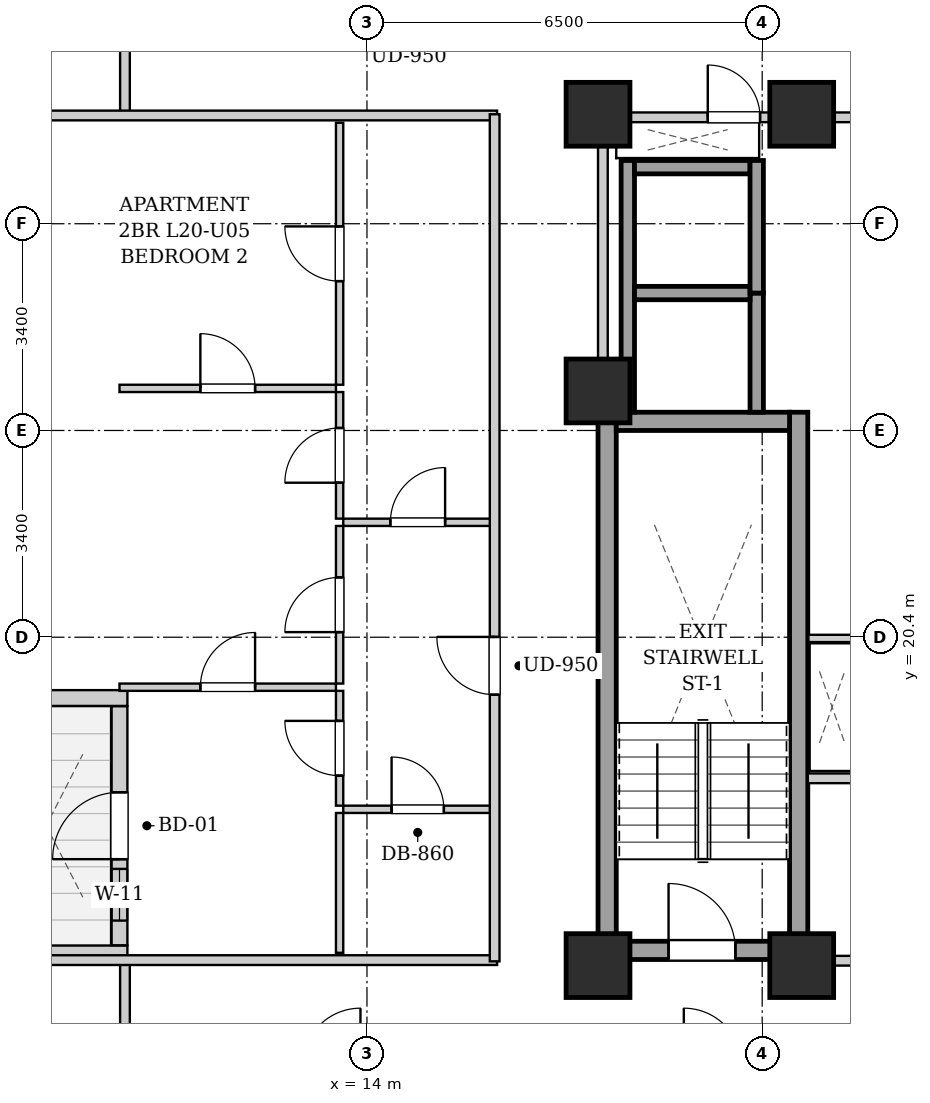
"""IFC4 building model, lengths in metres.
Left out: names, types, materials, properties, quantities, classifications, styles, units other than length and angle.
Written with IfcOpenShell. Run it as: python <this file> out.ifc"""

import sys

from ifc_helpers import new_model, si_unit, direction, frame, frame_2d, origin, origin_2d, place, context, subcontext, project, spatial, rectangle, extrude, element, fill, save


model = new_model("IFC4")
c1 = context("Model", 3, precision=1e-05, world=origin(), true_north=direction((0.0, 1.0)))
c2 = subcontext(c1, "Body", "Model", "MODEL_VIEW")
j1 = project(units=[si_unit("LENGTHUNIT", "METRE"), si_unit("PLANEANGLEUNIT", "RADIAN")], contexts=[c1])
p1 = place(None, origin())
s1 = spatial("IfcSite", under=j1, at=p1, CompositionType="ELEMENT")
p2 = place(p1, origin())
s2 = spatial("IfcBuilding", under=s1, at=p2, CompositionType="ELEMENT")
p3 = place(p2, frame((0.0, 0.0, 75.1)))
s3 = spatial("IfcBuildingStorey", under=s2, at=p3, CompositionType="ELEMENT", Elevation=75.1)
for number, where, z_axis, x_axis in (
    (1, (17.8, 15.0, 0.0), (0.0, 0.0, 1.0), (1.0, 0.0, 0.0)),
    (2, (21.15, 15.0, 0.0), (0.0, 0.0, 1.0), (1.0, 0.0, 0.0)),
    (3, (17.8, 29.0, 0.0), (0.0, 0.0, 1.0), (1.0, 0.0, 0.0)),
    (4, (21.15, 29.0, 0.0), (0.0, 0.0, 1.0), (1.0, 0.0, 0.0)),
    (5, (17.8, 24.45, 0.0), (0.0, 0.0, 1.0), (1.0, 0.0, 0.0)),
):
    element("IfcColumn", number, at=place(p3, frame(where, z_axis=z_axis, x_axis=x_axis)), inside=s3, PredefinedType="COLUMN", context=c2, shape_type="SweptSolid", body=[
        extrude(rectangle(XDim=1.05, YDim=1.05, at=origin_2d()), origin(), (0.0, 0.0, 1.0), 3.2),
    ])
p4 = place(p3, frame((7.66, 15.2, 0.0), z_axis=(0.0, 0.0, 1.0), x_axis=(1.0, 0.0, 0.0)))
e6 = element("IfcWall", 6, at=p4, inside=s3, PredefinedType="SOLIDWALL", context=c2, shape_type="SweptSolid", body=[
    extrude(rectangle(XDim=2.4, YDim=0.26, at=frame_2d((1.2, 0.0))), origin(), (0.0, 0.0, 1.0), 2.94),
])
p5 = place(p3, frame((9.93, 15.334, 0.0), z_axis=(0.0, 0.0, 1.0), x_axis=(0.0, 1.0, 0.0)))
e7 = element("IfcWall", 7, at=p5, inside=s3, PredefinedType="SOLIDWALL", context=c2, shape_type="SweptSolid", body=[
    extrude(rectangle(XDim=3.932, YDim=0.26, at=frame_2d((1.966, 0.0))), origin(), (0.0, 0.0, 1.0), 2.94),
])
p6 = place(p5, frame((1.416, 0.0, 0.0)))
e8 = element("IfcOpeningElement", 8, at=p6, cuts=e7, PredefinedType="OPENING", context=c2, shape_type="SweptSolid", body=[
    extrude(rectangle(XDim=1.1, YDim=2.0, at=frame_2d((0.55, 1.0))), frame((0.0, 0.14, 0.0), z_axis=(0.0, -1.0, 0.0), x_axis=(1.0, 0.0, 0.0)), (0.0, 0.0, 1.0), 0.28),
])
p7 = place(p5, frame((0.406, 0.0, 0.55)))
e9 = element("IfcOpeningElement", 9, at=p7, cuts=e7, PredefinedType="OPENING", context=c2, shape_type="SweptSolid", body=[
    extrude(rectangle(XDim=0.85, YDim=1.2, at=frame_2d((0.425, 0.6))), frame((0.0, 0.14, 0.0), z_axis=(0.0, -1.0, 0.0), x_axis=(1.0, 0.0, 0.0)), (0.0, 0.0, 1.0), 0.28),
])
p8 = place(p3, frame((10.06, 19.4, 0.0), z_axis=(0.0, 0.0, 1.0), x_axis=(-1.0, 0.0, 0.0)))
e10 = element("IfcWall", 10, at=p8, inside=s3, PredefinedType="SOLIDWALL", context=c2, shape_type="SweptSolid", body=[
    extrude(rectangle(XDim=2.4, YDim=0.26, at=frame_2d((1.2, 0.0))), origin(), (0.0, 0.0, 1.0), 2.94),
])
for number, where, z_axis, x_axis in (
    (11, (17.95, 15.1, 0.0), (0.0, 0.0, 1.0), (0.0, 1.0, 0.0)),
    (12, (21.1, 15.1, 0.0), (0.0, 0.0, 1.0), (0.0, 1.0, 0.0)),
):
    element("IfcWall", number, at=place(p3, frame(where, z_axis=z_axis, x_axis=x_axis)), inside=s3, PredefinedType="SHEAR", context=c2, shape_type="SweptSolid", body=[
        extrude(rectangle(XDim=9.0, YDim=0.3, at=frame_2d((4.5, 0.0))), origin(), (0.0, 0.0, 1.0), 2.94),
    ])
p9 = place(p3, frame((18.1, 23.95, 0.0), z_axis=(0.0, 0.0, 1.0), x_axis=(1.0, 0.0, 0.0)))
e13 = element("IfcWall", 13, at=p9, inside=s3, PredefinedType="SHEAR", context=c2, shape_type="SweptSolid", body=[
    extrude(rectangle(XDim=2.85, YDim=0.3, at=frame_2d((1.425, 0.0))), origin(), (0.0, 0.0, 1.0), 2.94),
])
p10 = place(p3, frame((18.1, 15.25, 0.0), z_axis=(0.0, 0.0, 1.0), x_axis=(1.0, 0.0, 0.0)))
e14 = element("IfcWall", 14, at=p10, inside=s3, PredefinedType="SHEAR", context=c2, shape_type="SweptSolid", body=[
    extrude(rectangle(XDim=2.85, YDim=0.3, at=frame_2d((1.425, 0.0))), origin(), (0.0, 0.0, 1.0), 2.94),
])
p11 = place(p10, frame((0.86, 0.0, 0.0)))
e15 = element("IfcOpeningElement", 15, at=p11, cuts=e14, PredefinedType="OPENING", context=c2, shape_type="SweptSolid", body=[
    extrude(rectangle(XDim=1.1, YDim=2.05, at=frame_2d((0.55, 1.025))), frame((0.0, 0.16, 0.0), z_axis=(0.0, -1.0, 0.0), x_axis=(1.0, 0.0, 0.0)), (0.0, 0.0, 1.0), 0.32),
])
p12 = place(p3, frame((18.29, 24.1, 0.0), z_axis=(0.0, 0.0, 1.0), x_axis=(0.0, 1.0, 0.0)))
e16 = element("IfcWall", 16, at=p12, inside=s3, PredefinedType="SHEAR", context=c2, shape_type="SweptSolid", body=[
    extrude(rectangle(XDim=4.14, YDim=0.22, at=frame_2d((2.07, 0.0))), origin(), (0.0, 0.0, 1.0), 2.94),
])
p13 = place(p3, frame((20.41, 24.1, 0.0), z_axis=(0.0, 0.0, 1.0), x_axis=(0.0, 1.0, 0.0)))
e17 = element("IfcWall", 17, at=p13, inside=s3, PredefinedType="SHEAR", context=c2, shape_type="SweptSolid", body=[
    extrude(rectangle(XDim=1.96, YDim=0.22, at=frame_2d((0.98, 0.0))), origin(), (0.0, 0.0, 1.0), 2.94),
])
for number, where, z_axis, x_axis in (
    (18, (18.4, 26.06, 0.0), (0.0, 0.0, 1.0), (1.0, 0.0, 0.0)),
    (19, (18.4, 28.13, 0.0), (0.0, 0.0, 1.0), (1.0, 0.0, 0.0)),
):
    element("IfcWall", number, at=place(p3, frame(where, z_axis=z_axis, x_axis=x_axis)), inside=s3, PredefinedType="SHEAR", context=c2, shape_type="SweptSolid", body=[
        extrude(rectangle(XDim=1.9, YDim=0.22, at=frame_2d((0.95, 0.0))), origin(), (0.0, 0.0, 1.0), 2.94),
    ])
p14 = place(p3, frame((20.41, 26.06, 0.0), z_axis=(0.0, 0.0, 1.0), x_axis=(0.0, 1.0, 0.0)))
e20 = element("IfcWall", 20, at=p14, inside=s3, PredefinedType="SHEAR", context=c2, shape_type="SweptSolid", body=[
    extrude(rectangle(XDim=2.18, YDim=0.22, at=frame_2d((1.09, 0.0))), origin(), (0.0, 0.0, 1.0), 2.94),
])
p15 = place(p3, frame((21.25, 15.08, 0.0), z_axis=(0.0, 0.0, 1.0), x_axis=(1.0, 0.0, 0.0)))
e21 = element("IfcWall", 21, at=p15, inside=s3, PredefinedType="PARTITIONING", context=c2, shape_type="SweptSolid", body=[
    extrude(rectangle(XDim=8.5, YDim=0.16, at=frame_2d((4.25, 0.0))), origin(), (0.0, 0.0, 1.0), 2.309),
])
p16 = place(p15, frame((3.725, 0.0, 0.0)))
e22 = element("IfcOpeningElement", 22, at=p16, cuts=e21, PredefinedType="OPENING", context=c2, shape_type="SweptSolid", body=[
    extrude(rectangle(XDim=1.05, YDim=2.05, at=frame_2d((0.525, 1.025))), frame((0.0, 0.09, 0.0), z_axis=(0.0, -1.0, 0.0), x_axis=(1.0, 0.0, 0.0)), (0.0, 0.0, 1.0), 0.18),
])
p17 = place(p3, frame((21.25, 18.08, 0.0), z_axis=(0.0, 0.0, 1.0), x_axis=(1.0, 0.0, 0.0)))
e23 = element("IfcWall", 23, at=p17, inside=s3, PredefinedType="PARTITIONING", context=c2, shape_type="SweptSolid", body=[
    extrude(rectangle(XDim=1.1, YDim=0.16, at=frame_2d((0.55, 0.0))), origin(), (0.0, 0.0, 1.0), 2.94),
])
p18 = place(p3, frame((17.88, 24.12, 0.0), z_axis=(0.0, 0.0, 1.0), x_axis=(0.0, 1.0, 0.0)))
e24 = element("IfcWall", 24, at=p18, inside=s3, PredefinedType="PARTITIONING", context=c2, shape_type="SweptSolid", body=[
    extrude(rectangle(XDim=4.76, YDim=0.16, at=frame_2d((2.38, 0.0))), origin(), (0.0, 0.0, 1.0), 2.94),
])
p19 = place(p3, frame((17.96, 28.95, 0.0), z_axis=(0.0, 0.0, 1.0), x_axis=(1.0, 0.0, 0.0)))
e25 = element("IfcWall", 25, at=p19, inside=s3, PredefinedType="PARTITIONING", context=c2, shape_type="SweptSolid", body=[
    extrude(rectangle(XDim=4.29, YDim=0.16, at=frame_2d((2.145, 0.0))), origin(), (0.0, 0.0, 1.0), 2.309),
])
p20 = place(p19, frame((1.645, 0.0, 0.0)))
e26 = element("IfcOpeningElement", 26, at=p20, cuts=e25, PredefinedType="OPENING", context=c2, shape_type="SweptSolid", body=[
    extrude(rectangle(XDim=0.86, YDim=2.05, at=frame_2d((0.43, 1.025))), frame((0.0, 0.09, 0.0), z_axis=(0.0, -1.0, 0.0), x_axis=(1.0, 0.0, 0.0)), (0.0, 0.0, 1.0), 0.18),
])
p21 = place(p3, frame((22.28, 20.38, 0.0), z_axis=(0.0, 0.0, 1.0), x_axis=(-1.0, 0.0, 0.0)))
e27 = element("IfcWall", 27, at=p21, inside=s3, PredefinedType="PARTITIONING", context=c2, shape_type="SweptSolid", body=[
    extrude(rectangle(XDim=1.02, YDim=0.12, at=frame_2d((0.51, 0.0))), origin(), (0.0, 0.0, 1.0), 2.94),
])
for number, where, z_axis, x_axis in (
    (28, (10.02, 13.35, 0.0), (0.0, 0.0, 1.0), (0.0, 1.0, 0.0)),
    (29, (10.02, 28.98, 0.0), (0.0, 0.0, 1.0), (0.0, 1.0, 0.0)),
):
    element("IfcWall", number, at=place(p3, frame(where, z_axis=z_axis, x_axis=x_axis)), inside=s3, PredefinedType="PARTITIONING", context=c2, shape_type="SweptSolid", body=[
        extrude(rectangle(XDim=1.74, YDim=0.16, at=frame_2d((0.87, 0.0))), origin(), (0.0, 0.0, 1.0), 2.94),
    ])
for number, where, z_axis, x_axis in (
    (30, (7.78, 15.09, 0.0), (0.0, 0.0, 1.0), (1.0, 0.0, 0.0)),
    (31, (7.78, 28.98, 0.0), (0.0, 0.0, 1.0), (1.0, 0.0, 0.0)),
):
    element("IfcWall", number, at=place(p3, frame(where, z_axis=z_axis, x_axis=x_axis)), inside=s3, PredefinedType="PARTITIONING", context=c2, shape_type="SweptSolid", body=[
        extrude(rectangle(XDim=8.36, YDim=0.16, at=frame_2d((4.18, 0.0))), origin(), (0.0, 0.0, 1.0), 2.309),
    ])
p22 = place(p3, frame((13.61, 22.29, 0.0), z_axis=(0.0, 0.0, 1.0), x_axis=(1.0, 0.0, 0.0)))
e32 = element("IfcWall", 32, at=p22, inside=s3, PredefinedType="PARTITIONING", context=c2, shape_type="SweptSolid", body=[
    extrude(rectangle(XDim=2.45, YDim=0.12, at=frame_2d((1.225, 0.0))), origin(), (0.0, 0.0, 1.0), 2.94),
])
p23 = place(p22, frame((0.775, 0.0, 0.0)))
e33 = element("IfcOpeningElement", 33, at=p23, cuts=e32, PredefinedType="OPENING", context=c2, shape_type="SweptSolid", body=[
    extrude(rectangle(XDim=0.9, YDim=2.05, at=frame_2d((0.45, 1.025))), frame((0.0, 0.07, 0.0), z_axis=(0.0, -1.0, 0.0), x_axis=(1.0, 0.0, 0.0)), (0.0, 0.0, 1.0), 0.14),
])
p24 = place(p3, frame((13.55, 22.35, 0.0), z_axis=(0.0, 0.0, 1.0), x_axis=(0.0, 1.0, 0.0)))
e34 = element("IfcWall", 34, at=p24, inside=s3, PredefinedType="PARTITIONING", context=c2, shape_type="SweptSolid", body=[
    extrude(rectangle(XDim=2.082, YDim=0.12, at=frame_2d((1.041, 0.0))), origin(), (0.0, 0.0, 1.0), 2.94),
])
p25 = place(p24, frame((0.591, 0.0, 0.0)))
e35 = element("IfcOpeningElement", 35, at=p25, cuts=e34, PredefinedType="OPENING", context=c2, shape_type="SweptSolid", body=[
    extrude(rectangle(XDim=0.9, YDim=2.05, at=frame_2d((0.45, 1.025))), frame((0.0, 0.07, 0.0), z_axis=(0.0, -1.0, 0.0), x_axis=(1.0, 0.0, 0.0)), (0.0, 0.0, 1.0), 0.14),
])
p26 = place(p3, frame((13.55, 24.552, 0.0), z_axis=(0.0, 0.0, 1.0), x_axis=(0.0, 1.0, 0.0)))
e36 = element("IfcWall", 36, at=p26, inside=s3, PredefinedType="PARTITIONING", context=c2, shape_type="SweptSolid", body=[
    extrude(rectangle(XDim=4.308, YDim=0.12, at=frame_2d((2.154, 0.0))), origin(), (0.0, 0.0, 1.0), 2.94),
])
p27 = place(p26, frame((1.704, 0.0, 0.0)))
e37 = element("IfcOpeningElement", 37, at=p27, cuts=e36, PredefinedType="OPENING", context=c2, shape_type="SweptSolid", body=[
    extrude(rectangle(XDim=0.9, YDim=2.05, at=frame_2d((0.45, 1.025))), frame((0.0, 0.07, 0.0), z_axis=(0.0, -1.0, 0.0), x_axis=(1.0, 0.0, 0.0)), (0.0, 0.0, 1.0), 0.14),
])
p28 = place(p3, frame((13.61, 17.57, 0.0), z_axis=(0.0, 0.0, 1.0), x_axis=(1.0, 0.0, 0.0)))
e38 = element("IfcWall", 38, at=p28, inside=s3, PredefinedType="PARTITIONING", context=c2, shape_type="SweptSolid", body=[
    extrude(rectangle(XDim=2.45, YDim=0.12, at=frame_2d((1.225, 0.0))), origin(), (0.0, 0.0, 1.0), 2.94),
])
p29 = place(p28, frame((0.795, 0.0, 0.0)))
e39 = element("IfcOpeningElement", 39, at=p29, cuts=e38, PredefinedType="OPENING", context=c2, shape_type="SweptSolid", body=[
    extrude(rectangle(XDim=0.86, YDim=2.05, at=frame_2d((0.43, 1.025))), frame((0.0, 0.07, 0.0), z_axis=(0.0, -1.0, 0.0), x_axis=(1.0, 0.0, 0.0)), (0.0, 0.0, 1.0), 0.14),
])
p30 = place(p3, frame((13.55, 15.21, 0.0), z_axis=(0.0, 0.0, 1.0), x_axis=(0.0, 1.0, 0.0)))
e40 = element("IfcWall", 40, at=p30, inside=s3, PredefinedType="PARTITIONING", context=c2, shape_type="SweptSolid", body=[
    extrude(rectangle(XDim=2.3, YDim=0.12, at=frame_2d((1.15, 0.0))), origin(), (0.0, 0.0, 1.0), 2.94),
])
p31 = place(p3, frame((13.55, 17.63, 0.0), z_axis=(0.0, 0.0, 1.0), x_axis=(0.0, 1.0, 0.0)))
e41 = element("IfcWall", 41, at=p31, inside=s3, PredefinedType="PARTITIONING", context=c2, shape_type="SweptSolid", body=[
    extrude(rectangle(XDim=1.888, YDim=0.12, at=frame_2d((0.944, 0.0))), origin(), (0.0, 0.0, 1.0), 2.94),
])
p32 = place(p31, frame((0.494, 0.0, 0.0)))
e42 = element("IfcOpeningElement", 42, at=p32, cuts=e41, PredefinedType="OPENING", context=c2, shape_type="SweptSolid", body=[
    extrude(rectangle(XDim=0.9, YDim=2.05, at=frame_2d((0.45, 1.025))), frame((0.0, 0.07, 0.0), z_axis=(0.0, -1.0, 0.0), x_axis=(1.0, 0.0, 0.0)), (0.0, 0.0, 1.0), 0.14),
])
p33 = place(p3, frame((13.55, 19.638, 0.0), z_axis=(0.0, 0.0, 1.0), x_axis=(0.0, 1.0, 0.0)))
e43 = element("IfcWall", 43, at=p33, inside=s3, PredefinedType="PARTITIONING", context=c2, shape_type="SweptSolid", body=[
    extrude(rectangle(XDim=2.592, YDim=0.12, at=frame_2d((1.296, 0.0))), origin(), (0.0, 0.0, 1.0), 2.94),
])
p34 = place(p33, frame((0.846, 0.0, 0.0)))
e44 = element("IfcOpeningElement", 44, at=p34, cuts=e43, PredefinedType="OPENING", context=c2, shape_type="SweptSolid", body=[
    extrude(rectangle(XDim=0.9, YDim=2.05, at=frame_2d((0.45, 1.025))), frame((0.0, 0.07, 0.0), z_axis=(0.0, -1.0, 0.0), x_axis=(1.0, 0.0, 0.0)), (0.0, 0.0, 1.0), 0.14),
])
p35 = place(p3, frame((9.93, 19.578, 0.0), z_axis=(0.0, 0.0, 1.0), x_axis=(1.0, 0.0, 0.0)))
e45 = element("IfcWall", 45, at=p35, inside=s3, PredefinedType="PARTITIONING", context=c2, shape_type="SweptSolid", body=[
    extrude(rectangle(XDim=3.56, YDim=0.12, at=frame_2d((1.78, 0.0))), origin(), (0.0, 0.0, 1.0), 2.94),
])
p36 = place(p35, frame((1.33, 0.0, 0.0)))
e46 = element("IfcOpeningElement", 46, at=p36, cuts=e45, PredefinedType="OPENING", context=c2, shape_type="SweptSolid", body=[
    extrude(rectangle(XDim=0.9, YDim=2.05, at=frame_2d((0.45, 1.025))), frame((0.0, 0.07, 0.0), z_axis=(0.0, -1.0, 0.0), x_axis=(1.0, 0.0, 0.0)), (0.0, 0.0, 1.0), 0.14),
])
p37 = place(p3, frame((9.93, 24.492, 0.0), z_axis=(0.0, 0.0, 1.0), x_axis=(1.0, 0.0, 0.0)))
e47 = element("IfcWall", 47, at=p37, inside=s3, PredefinedType="PARTITIONING", context=c2, shape_type="SweptSolid", body=[
    extrude(rectangle(XDim=3.56, YDim=0.12, at=frame_2d((1.78, 0.0))), origin(), (0.0, 0.0, 1.0), 2.518),
])
p38 = place(p37, frame((1.33, 0.0, 0.0)))
e48 = element("IfcOpeningElement", 48, at=p38, cuts=e47, PredefinedType="OPENING", context=c2, shape_type="SweptSolid", body=[
    extrude(rectangle(XDim=0.9, YDim=2.05, at=frame_2d((0.45, 1.025))), frame((0.0, 0.07, 0.0), z_axis=(0.0, -1.0, 0.0), x_axis=(1.0, 0.0, 0.0)), (0.0, 0.0, 1.0), 0.14),
])
p39 = place(p3, frame((16.1, 15.07, 0.0), z_axis=(0.0, 0.0, 1.0), x_axis=(0.0, 1.0, 0.0)))
e49 = element("IfcWall", 49, at=p39, inside=s3, PredefinedType="PARTITIONING", context=c2, shape_type="SweptSolid", body=[
    extrude(rectangle(XDim=13.93, YDim=0.16, at=frame_2d((6.965, 0.0))), origin(), (0.0, 0.0, 1.0), 2.94),
])
p40 = place(p39, frame((4.385, 0.0, 0.0)))
e50 = element("IfcOpeningElement", 50, at=p40, cuts=e49, PredefinedType="OPENING", context=c2, shape_type="SweptSolid", body=[
    extrude(rectangle(XDim=0.95, YDim=2.1, at=frame_2d((0.475, 1.05))), frame((0.0, 0.09, 0.0), z_axis=(0.0, -1.0, 0.0), x_axis=(1.0, 0.0, 0.0)), (0.0, 0.0, 1.0), 0.18),
])
p41 = place(p11, origin())
e51 = element("IfcDoor", 51, at=p41, inside=s3, OperationType="SINGLE_SWING_LEFT", PredefinedType="DOOR", context=c2, shape_type="SweptSolid", body=[
    extrude(rectangle(XDim=1.1, YDim=2.05, at=frame_2d((0.55, 1.025))), frame((0.0, 0.025, 0.0), z_axis=(0.0, -1.0, 0.0), x_axis=(1.0, 0.0, 0.0)), (0.0, 0.0, 1.0), 0.05),
])
fill(e15, e51)
p42 = place(p20, origin())
e52 = element("IfcDoor", 52, at=p42, inside=s3, OperationType="SINGLE_SWING_LEFT", PredefinedType="DOOR", context=c2, shape_type="SweptSolid", body=[
    extrude(rectangle(XDim=0.86, YDim=2.05, at=frame_2d((0.43, 1.025))), frame((0.0, 0.025, 0.0), z_axis=(0.0, -1.0, 0.0), x_axis=(1.0, 0.0, 0.0)), (0.0, 0.0, 1.0), 0.05),
])
fill(e26, e52)
p43 = place(p23, origin())
e53 = element("IfcDoor", 53, at=p43, inside=s3, OperationType="SINGLE_SWING_RIGHT", PredefinedType="DOOR", context=c2, shape_type="SweptSolid", body=[
    extrude(rectangle(XDim=0.9, YDim=2.05, at=frame_2d((0.45, 1.025))), frame((0.0, 0.025, 0.0), z_axis=(0.0, -1.0, 0.0), x_axis=(1.0, 0.0, 0.0)), (0.0, 0.0, 1.0), 0.05),
])
fill(e33, e53)
p44 = place(p25, origin())
e54 = element("IfcDoor", 54, at=p44, inside=s3, OperationType="SINGLE_SWING_LEFT", PredefinedType="DOOR", context=c2, shape_type="SweptSolid", body=[
    extrude(rectangle(XDim=0.9, YDim=2.05, at=frame_2d((0.45, 1.025))), frame((0.0, 0.025, 0.0), z_axis=(0.0, -1.0, 0.0), x_axis=(1.0, 0.0, 0.0)), (0.0, 0.0, 1.0), 0.05),
])
fill(e35, e54)
p45 = place(p27, origin())
e55 = element("IfcDoor", 55, at=p45, inside=s3, OperationType="SINGLE_SWING_RIGHT", PredefinedType="DOOR", context=c2, shape_type="SweptSolid", body=[
    extrude(rectangle(XDim=0.9, YDim=2.05, at=frame_2d((0.45, 1.025))), frame((0.0, 0.025, 0.0), z_axis=(0.0, -1.0, 0.0), x_axis=(1.0, 0.0, 0.0)), (0.0, 0.0, 1.0), 0.05),
])
fill(e37, e55)
p46 = place(p29, origin())
e56 = element("IfcDoor", 56, at=p46, inside=s3, OperationType="SINGLE_SWING_LEFT", PredefinedType="DOOR", context=c2, shape_type="SweptSolid", body=[
    extrude(rectangle(XDim=0.86, YDim=2.05, at=frame_2d((0.43, 1.025))), frame((0.0, 0.025, 0.0), z_axis=(0.0, -1.0, 0.0), x_axis=(1.0, 0.0, 0.0)), (0.0, 0.0, 1.0), 0.05),
])
fill(e39, e56)
p47 = place(p32, origin())
e57 = element("IfcDoor", 57, at=p47, inside=s3, OperationType="SINGLE_SWING_RIGHT", PredefinedType="DOOR", context=c2, shape_type="SweptSolid", body=[
    extrude(rectangle(XDim=0.9, YDim=2.05, at=frame_2d((0.45, 1.025))), frame((0.0, 0.025, 0.0), z_axis=(0.0, -1.0, 0.0), x_axis=(1.0, 0.0, 0.0)), (0.0, 0.0, 1.0), 0.05),
])
fill(e42, e57)
p48 = place(p34, origin())
e58 = element("IfcDoor", 58, at=p48, inside=s3, OperationType="SINGLE_SWING_LEFT", PredefinedType="DOOR", context=c2, shape_type="SweptSolid", body=[
    extrude(rectangle(XDim=0.9, YDim=2.05, at=frame_2d((0.45, 1.025))), frame((0.0, 0.025, 0.0), z_axis=(0.0, -1.0, 0.0), x_axis=(1.0, 0.0, 0.0)), (0.0, 0.0, 1.0), 0.05),
])
fill(e44, e58)
p49 = place(p36, origin())
e59 = element("IfcDoor", 59, at=p49, inside=s3, OperationType="SINGLE_SWING_RIGHT", PredefinedType="DOOR", context=c2, shape_type="SweptSolid", body=[
    extrude(rectangle(XDim=0.9, YDim=2.05, at=frame_2d((0.45, 1.025))), frame((0.0, 0.025, 0.0), z_axis=(0.0, -1.0, 0.0), x_axis=(1.0, 0.0, 0.0)), (0.0, 0.0, 1.0), 0.05),
])
fill(e46, e59)
p50 = place(p38, origin())
e60 = element("IfcDoor", 60, at=p50, inside=s3, OperationType="SINGLE_SWING_LEFT", PredefinedType="DOOR", context=c2, shape_type="SweptSolid", body=[
    extrude(rectangle(XDim=0.9, YDim=2.05, at=frame_2d((0.45, 1.025))), frame((0.0, 0.025, 0.0), z_axis=(0.0, -1.0, 0.0), x_axis=(1.0, 0.0, 0.0)), (0.0, 0.0, 1.0), 0.05),
])
fill(e48, e60)
p51 = place(p40, origin())
e61 = element("IfcDoor", 61, at=p51, inside=s3, OperationType="SINGLE_SWING_RIGHT", PredefinedType="DOOR", context=c2, shape_type="SweptSolid", body=[
    extrude(rectangle(XDim=0.95, YDim=2.1, at=frame_2d((0.475, 1.05))), frame((0.0, 0.025, 0.0), z_axis=(0.0, -1.0, 0.0), x_axis=(1.0, 0.0, 0.0)), (0.0, 0.0, 1.0), 0.05),
])
fill(e50, e61)
p52 = place(p6, origin())
e62 = element("IfcDoor", 62, at=p52, inside=s3, OperationType="SINGLE_SWING_LEFT", PredefinedType="DOOR", context=c2, shape_type="SweptSolid", body=[
    extrude(rectangle(XDim=1.1, YDim=2.0, at=frame_2d((0.55, 1.0))), frame((0.0, 0.025, 0.0), z_axis=(0.0, -1.0, 0.0), x_axis=(1.0, 0.0, 0.0)), (0.0, 0.0, 1.0), 0.05),
])
fill(e8, e62)
p53 = place(p7, origin())
e63 = element("IfcWindow", 63, at=p53, inside=s3, PartitioningType="SINGLE_PANEL", PredefinedType="WINDOW", context=c2, shape_type="SweptSolid", body=[
    extrude(rectangle(XDim=0.85, YDim=1.2, at=frame_2d((0.425, 0.6))), frame((0.0, 0.03, 0.0), z_axis=(0.0, -1.0, 0.0), x_axis=(1.0, 0.0, 0.0)), (0.0, 0.0, 1.0), 0.06),
])
fill(e9, e63)
save(model, sys.argv[1])
